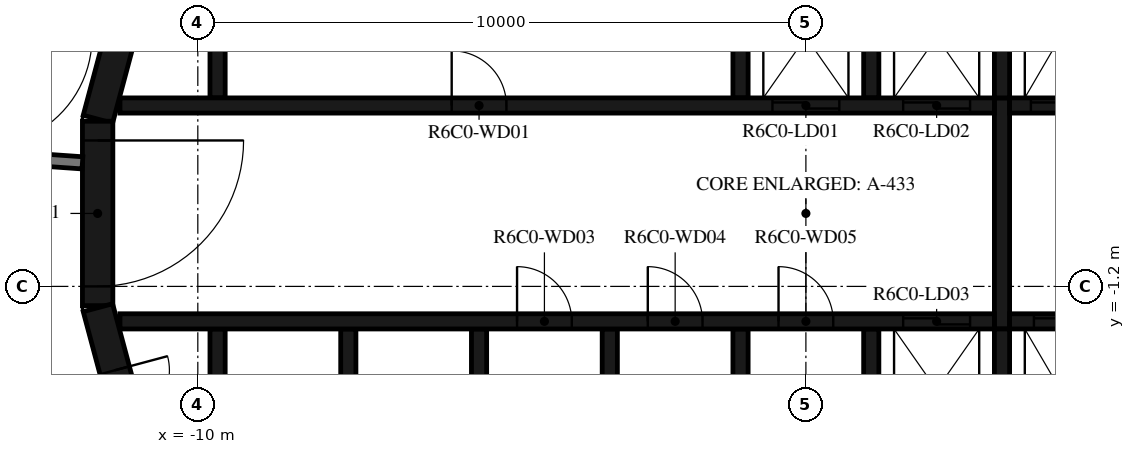
"""IFC4 building model, lengths in metres.
Left out: names, types, materials, properties, quantities, classifications, styles, units other than length and angle.
Written with IfcOpenShell. Run it as: python <this file> out.ifc"""

import sys

from ifc_helpers import new_model, si_unit, direction, frame, frame_2d, origin, place, context, subcontext, project, spatial, polyline, rectangle, outline, extrude, element, fill, save


model = new_model("IFC4")
c1 = context("Model", 3, precision=1e-05, world=origin(), true_north=direction((0.0, 1.0)))
c2 = subcontext(c1, "Body", "Model", "MODEL_VIEW")
j1 = project(units=[si_unit("LENGTHUNIT", "METRE"), si_unit("PLANEANGLEUNIT", "RADIAN")], contexts=[c1])
p1 = place(None, origin())
s1 = spatial("IfcSite", under=j1, at=p1, CompositionType="ELEMENT")
p2 = place(p1, origin())
s2 = spatial("IfcBuilding", under=s1, at=p2, CompositionType="ELEMENT")
p3 = place(p2, frame((0.0, 0.0, 254.7)))
s3 = spatial("IfcBuildingStorey", under=s2, at=p3, CompositionType="ELEMENT", Elevation=254.7)
p4 = place(p3, frame((-10.858, 4.479, 0.0), z_axis=(0.0, 0.0, 1.0), x_axis=(-0.258734743916, -0.965948410781, 0.0)))
e1 = element("IfcWall", 1, at=p4, inside=s3, PredefinedType="SHEAR", context=c2, shape_type="SweptSolid", body=[
    extrude(rectangle(XDim=3.033, YDim=0.5, at=frame_2d((1.516, 0.0))), origin(), (0.0, 0.0, 1.0), 3.05),
])
p5 = place(p3, frame((-11.647, 1.516, 0.0), z_axis=(0.0, 0.0, 1.0), x_axis=(0.0, -1.0, 0.0)))
e2 = element("IfcWall", 2, at=p5, inside=s3, PredefinedType="SHEAR", context=c2, shape_type="SweptSolid", body=[
    extrude(rectangle(XDim=3.033, YDim=0.5, at=frame_2d((1.516, 0.0))), origin(), (0.0, 0.0, 1.0), 3.05),
])
p6 = place(p5, frame((0.316, 0.0, 0.0)))
e3 = element("IfcOpeningElement", 3, at=p6, cuts=e2, PredefinedType="OPENING", context=c2, shape_type="SweptSolid", body=[
    extrude(rectangle(XDim=2.4, YDim=2.1, at=frame_2d((1.2, 1.05))), frame((0.0, 0.26, 0.0), z_axis=(0.0, -1.0, 0.0), x_axis=(1.0, 0.0, 0.0)), (0.0, 0.0, 1.0), 0.52),
])
p7 = place(p3, frame((-11.643, -1.55, 0.0), z_axis=(0.0, 0.0, 1.0), x_axis=(0.258734743916, -0.965948410781, 0.0)))
e4 = element("IfcWall", 4, at=p7, inside=s3, PredefinedType="SHEAR", context=c2, shape_type="SweptSolid", body=[
    extrude(rectangle(XDim=3.033, YDim=0.5, at=frame_2d((1.516, 0.0))), origin(), (0.0, 0.0, 1.0), 3.05),
])
p8 = place(p7, frame((1.066, 0.0, 0.0)))
e5 = element("IfcOpeningElement", 5, at=p8, cuts=e4, PredefinedType="OPENING", context=c2, shape_type="SweptSolid", body=[
    extrude(rectangle(XDim=0.9, YDim=2.1, at=frame_2d((0.45, 1.05))), frame((0.0, 0.26, 0.0), z_axis=(0.0, -1.0, 0.0), x_axis=(1.0, 0.0, 0.0)), (0.0, 0.0, 1.0), 0.52),
])
p9 = place(p3, origin())
e6 = element("IfcWall", 6, at=p9, inside=s3, PredefinedType="SHEAR", context=c2, shape_type="SweptSolid", body=[
    extrude(outline(polyline([(-9.55, 4.8), (-1.2, 4.8), (-1.2, 1.9), (-0.95, 1.9), (-0.95, 4.8), (0.95, 4.8), (0.95, 1.9), (1.2, 1.9), (1.2, 4.8), (3.1, 4.8), (3.1, 1.9), (3.35, 1.9), (3.35, 4.8), (5.25, 4.8), (5.25, 1.9), (5.5, 1.9), (5.5, 4.8), (7.4, 4.8), (7.4, 1.9), (7.65, 1.9), (7.65, 4.8), (9.55, 4.8), (9.55, 1.9), (9.8, 1.9), (9.8, 4.8), (9.8, 5.05), (-9.8, 5.05), (-9.8, 4.8), (-9.8, 1.9), (-9.55, 1.9), (-9.55, 4.8)])), origin(), (0.0, 0.0, 1.0), 3.05),
])
p10 = place(p3, origin())
e7 = element("IfcWall", 7, at=p10, inside=s3, PredefinedType="SHEAR", context=c2, shape_type="SweptSolid", body=[
    extrude(outline(polyline([(9.8, -5.05), (9.8, -4.8), (9.8, -1.9), (9.55, -1.9), (9.55, -4.8), (7.65, -4.8), (7.65, -1.9), (7.4, -1.9), (7.4, -4.8), (5.5, -4.8), (5.5, -1.9), (5.25, -1.9), (5.25, -4.8), (3.35, -4.8), (3.35, -1.9), (3.1, -1.9), (3.1, -4.8), (1.2, -4.8), (1.2, -1.9), (0.95, -1.9), (0.95, -4.8), (-0.95, -4.8), (-0.95, -1.9), (-1.2, -1.9), (-1.2, -4.8), (-3.1, -4.8), (-3.1, -1.9), (-3.35, -1.9), (-3.35, -4.8), (-5.25, -4.8), (-5.25, -1.9), (-5.5, -1.9), (-5.5, -4.8), (-7.4, -4.8), (-7.4, -1.9), (-7.65, -1.9), (-7.65, -4.8), (-9.55, -4.8), (-9.55, -1.9), (-9.8, -1.9), (-9.8, -4.8), (-9.8, -5.05), (9.8, -5.05)])), origin(), (0.0, 0.0, 1.0), 3.05),
])
p11 = place(p3, frame((-11.28, 1.775, 0.0), z_axis=(0.0, 0.0, 1.0), x_axis=(1.0, 0.0, 0.0)))
e8 = element("IfcWall", 8, at=p11, inside=s3, PredefinedType="SHEAR", context=c2, shape_type="SweptSolid", body=[
    extrude(rectangle(XDim=14.38, YDim=0.25, at=frame_2d((7.19, 0.0))), origin(), (0.0, 0.0, 1.0), 3.05),
])
p12 = place(p11, frame((10.73, 0.0, 0.0)))
e9 = element("IfcOpeningElement", 9, at=p12, cuts=e8, PredefinedType="OPENING", context=c2, shape_type="SweptSolid", body=[
    extrude(rectangle(XDim=1.1, YDim=2.1, at=frame_2d((0.55, 1.05))), frame((0.0, 0.135, 0.0), z_axis=(0.0, -1.0, 0.0), x_axis=(1.0, 0.0, 0.0)), (0.0, 0.0, 1.0), 0.27),
])
p13 = place(p11, frame((12.88, 0.0, 0.0)))
e10 = element("IfcOpeningElement", 10, at=p13, cuts=e8, PredefinedType="OPENING", context=c2, shape_type="SweptSolid", body=[
    extrude(rectangle(XDim=1.1, YDim=2.1, at=frame_2d((0.55, 1.05))), frame((0.0, 0.135, 0.0), z_axis=(0.0, -1.0, 0.0), x_axis=(1.0, 0.0, 0.0)), (0.0, 0.0, 1.0), 0.27),
])
p14 = place(p11, frame((5.455, 0.0, 0.0)))
e11 = element("IfcOpeningElement", 11, at=p14, cuts=e8, PredefinedType="OPENING", context=c2, shape_type="SweptSolid", body=[
    extrude(rectangle(XDim=0.9, YDim=2.1, at=frame_2d((0.45, 1.05))), frame((0.0, 0.135, 0.0), z_axis=(0.0, -1.0, 0.0), x_axis=(1.0, 0.0, 0.0)), (0.0, 0.0, 1.0), 0.27),
])
p15 = place(p3, frame((3.35, 1.775, 0.0), z_axis=(0.0, 0.0, 1.0), x_axis=(1.0, 0.0, 0.0)))
e12 = element("IfcWall", 12, at=p15, inside=s3, PredefinedType="SHEAR", context=c2, shape_type="SweptSolid", body=[
    extrude(rectangle(XDim=7.93, YDim=0.25, at=frame_2d((3.965, 0.0))), origin(), (0.0, 0.0, 1.0), 3.05),
])
p16 = place(p15, frame((0.35, 0.0, 0.0)))
e13 = element("IfcOpeningElement", 13, at=p16, cuts=e12, PredefinedType="OPENING", context=c2, shape_type="SweptSolid", body=[
    extrude(rectangle(XDim=1.2, YDim=2.4, at=frame_2d((0.6, 1.2))), frame((0.0, 0.135, 0.0), z_axis=(0.0, -1.0, 0.0), x_axis=(1.0, 0.0, 0.0)), (0.0, 0.0, 1.0), 0.27),
])
p17 = place(p15, frame((2.5, 0.0, 0.0)))
e14 = element("IfcOpeningElement", 14, at=p17, cuts=e12, PredefinedType="OPENING", context=c2, shape_type="SweptSolid", body=[
    extrude(rectangle(XDim=1.2, YDim=2.4, at=frame_2d((0.6, 1.2))), frame((0.0, 0.135, 0.0), z_axis=(0.0, -1.0, 0.0), x_axis=(1.0, 0.0, 0.0)), (0.0, 0.0, 1.0), 0.27),
])
p18 = place(p15, frame((4.8, 0.0, 0.0)))
e15 = element("IfcOpeningElement", 15, at=p18, cuts=e12, PredefinedType="OPENING", context=c2, shape_type="SweptSolid", body=[
    extrude(rectangle(XDim=0.9, YDim=2.1, at=frame_2d((0.45, 1.05))), frame((0.0, 0.135, 0.0), z_axis=(0.0, -1.0, 0.0), x_axis=(1.0, 0.0, 0.0)), (0.0, 0.0, 1.0), 0.27),
])
p19 = place(p3, frame((-11.28, -1.775, 0.0), z_axis=(0.0, 0.0, 1.0), x_axis=(1.0, 0.0, 0.0)))
e16 = element("IfcWall", 16, at=p19, inside=s3, PredefinedType="SHEAR", context=c2, shape_type="SweptSolid", body=[
    extrude(rectangle(XDim=14.38, YDim=0.25, at=frame_2d((7.19, 0.0))), origin(), (0.0, 0.0, 1.0), 3.05),
])
p20 = place(p19, frame((12.88, 0.0, 0.0)))
e17 = element("IfcOpeningElement", 17, at=p20, cuts=e16, PredefinedType="OPENING", context=c2, shape_type="SweptSolid", body=[
    extrude(rectangle(XDim=1.1, YDim=2.1, at=frame_2d((0.55, 1.05))), frame((0.0, 0.135, 0.0), z_axis=(0.0, -1.0, 0.0), x_axis=(1.0, 0.0, 0.0)), (0.0, 0.0, 1.0), 0.27),
])
p21 = place(p19, frame((6.53, 0.0, 0.0)))
e18 = element("IfcOpeningElement", 18, at=p21, cuts=e16, PredefinedType="OPENING", context=c2, shape_type="SweptSolid", body=[
    extrude(rectangle(XDim=0.9, YDim=2.1, at=frame_2d((0.45, 1.05))), frame((0.0, 0.135, 0.0), z_axis=(0.0, -1.0, 0.0), x_axis=(1.0, 0.0, 0.0)), (0.0, 0.0, 1.0), 0.27),
])
p22 = place(p19, frame((8.68, 0.0, 0.0)))
e19 = element("IfcOpeningElement", 19, at=p22, cuts=e16, PredefinedType="OPENING", context=c2, shape_type="SweptSolid", body=[
    extrude(rectangle(XDim=0.9, YDim=2.1, at=frame_2d((0.45, 1.05))), frame((0.0, 0.135, 0.0), z_axis=(0.0, -1.0, 0.0), x_axis=(1.0, 0.0, 0.0)), (0.0, 0.0, 1.0), 0.27),
])
p23 = place(p19, frame((10.83, 0.0, 0.0)))
e20 = element("IfcOpeningElement", 20, at=p23, cuts=e16, PredefinedType="OPENING", context=c2, shape_type="SweptSolid", body=[
    extrude(rectangle(XDim=0.9, YDim=2.1, at=frame_2d((0.45, 1.05))), frame((0.0, 0.135, 0.0), z_axis=(0.0, -1.0, 0.0), x_axis=(1.0, 0.0, 0.0)), (0.0, 0.0, 1.0), 0.27),
])
p24 = place(p3, frame((3.35, -1.775, 0.0), z_axis=(0.0, 0.0, 1.0), x_axis=(1.0, 0.0, 0.0)))
e21 = element("IfcWall", 21, at=p24, inside=s3, PredefinedType="SHEAR", context=c2, shape_type="SweptSolid", body=[
    extrude(rectangle(XDim=7.93, YDim=0.25, at=frame_2d((3.965, 0.0))), origin(), (0.0, 0.0, 1.0), 3.05),
])
p25 = place(p24, frame((0.4, 0.0, 0.0)))
e22 = element("IfcOpeningElement", 22, at=p25, cuts=e21, PredefinedType="OPENING", context=c2, shape_type="SweptSolid", body=[
    extrude(rectangle(XDim=1.1, YDim=2.4, at=frame_2d((0.55, 1.2))), frame((0.0, 0.135, 0.0), z_axis=(0.0, -1.0, 0.0), x_axis=(1.0, 0.0, 0.0)), (0.0, 0.0, 1.0), 0.27),
])
p26 = place(p24, frame((2.55, 0.0, 0.0)))
e23 = element("IfcOpeningElement", 23, at=p26, cuts=e21, PredefinedType="OPENING", context=c2, shape_type="SweptSolid", body=[
    extrude(rectangle(XDim=1.1, YDim=2.4, at=frame_2d((0.55, 1.2))), frame((0.0, 0.135, 0.0), z_axis=(0.0, -1.0, 0.0), x_axis=(1.0, 0.0, 0.0)), (0.0, 0.0, 1.0), 0.27),
])
p27 = place(p24, frame((4.7, 0.0, 0.0)))
e24 = element("IfcOpeningElement", 24, at=p27, cuts=e21, PredefinedType="OPENING", context=c2, shape_type="SweptSolid", body=[
    extrude(rectangle(XDim=1.1, YDim=2.4, at=frame_2d((0.55, 1.2))), frame((0.0, 0.135, 0.0), z_axis=(0.0, -1.0, 0.0), x_axis=(1.0, 0.0, 0.0)), (0.0, 0.0, 1.0), 0.27),
])
p28 = place(p3, frame((3.225, -1.9, 0.0), z_axis=(0.0, 0.0, 1.0), x_axis=(0.0, 1.0, 0.0)))
e25 = element("IfcWall", 25, at=p28, inside=s3, PredefinedType="SHEAR", context=c2, shape_type="SweptSolid", body=[
    extrude(rectangle(XDim=3.8, YDim=0.25, at=frame_2d((1.9, 0.0))), origin(), (0.0, 0.0, 1.0), 3.05),
])
p29 = place(p3, frame((-13.454, 0.941, 0.0), z_axis=(0.0, 0.0, 1.0), x_axis=(0.99755155062, -0.069934997354, 0.0)))
e26 = element("IfcWall", 26, at=p29, inside=s3, PredefinedType="STANDARD", context=c2, shape_type="SweptSolid", body=[
    extrude(rectangle(XDim=1.561, YDim=0.2, at=frame_2d((0.78, 0.0))), origin(), (0.0, 0.0, 1.0), 3.05),
])
p30 = place(p6, origin())
e27 = element("IfcDoor", 27, at=p30, inside=s3, OperationType="DOUBLE_DOOR_SINGLE_SWING", PredefinedType="DOOR", context=c2, shape_type="SweptSolid", body=[
    extrude(rectangle(XDim=2.4, YDim=2.1, at=frame_2d((1.2, 1.05))), frame((0.0, 0.025, 0.0), z_axis=(0.0, -1.0, 0.0), x_axis=(1.0, 0.0, 0.0)), (0.0, 0.0, 1.0), 0.05),
])
fill(e3, e27)
p31 = place(p12, origin())
e28 = element("IfcDoor", 28, at=p31, inside=s3, OperationType="DOUBLE_DOOR_SLIDING", PredefinedType="DOOR", context=c2, shape_type="SweptSolid", body=[
    extrude(rectangle(XDim=1.1, YDim=2.1, at=frame_2d((0.55, 1.05))), frame((0.0, 0.025, 0.0), z_axis=(0.0, -1.0, 0.0), x_axis=(1.0, 0.0, 0.0)), (0.0, 0.0, 1.0), 0.05),
])
fill(e9, e28)
p32 = place(p13, origin())
e29 = element("IfcDoor", 29, at=p32, inside=s3, OperationType="DOUBLE_DOOR_SLIDING", PredefinedType="DOOR", context=c2, shape_type="SweptSolid", body=[
    extrude(rectangle(XDim=1.1, YDim=2.1, at=frame_2d((0.55, 1.05))), frame((0.0, 0.025, 0.0), z_axis=(0.0, -1.0, 0.0), x_axis=(1.0, 0.0, 0.0)), (0.0, 0.0, 1.0), 0.05),
])
fill(e10, e29)
p33 = place(p16, origin())
e30 = element("IfcDoor", 30, at=p33, inside=s3, OperationType="DOUBLE_DOOR_SLIDING", PredefinedType="DOOR", context=c2, shape_type="SweptSolid", body=[
    extrude(rectangle(XDim=1.2, YDim=2.4, at=frame_2d((0.6, 1.2))), frame((0.0, 0.025, 0.0), z_axis=(0.0, -1.0, 0.0), x_axis=(1.0, 0.0, 0.0)), (0.0, 0.0, 1.0), 0.05),
])
fill(e13, e30)
p34 = place(p20, origin())
e31 = element("IfcDoor", 31, at=p34, inside=s3, OperationType="DOUBLE_DOOR_SLIDING", PredefinedType="DOOR", context=c2, shape_type="SweptSolid", body=[
    extrude(rectangle(XDim=1.1, YDim=2.1, at=frame_2d((0.55, 1.05))), frame((0.0, 0.025, 0.0), z_axis=(0.0, -1.0, 0.0), x_axis=(1.0, 0.0, 0.0)), (0.0, 0.0, 1.0), 0.05),
])
fill(e17, e31)
p35 = place(p25, origin())
e32 = element("IfcDoor", 32, at=p35, inside=s3, OperationType="DOUBLE_DOOR_SLIDING", PredefinedType="DOOR", context=c2, shape_type="SweptSolid", body=[
    extrude(rectangle(XDim=1.1, YDim=2.4, at=frame_2d((0.55, 1.2))), frame((0.0, 0.025, 0.0), z_axis=(0.0, -1.0, 0.0), x_axis=(1.0, 0.0, 0.0)), (0.0, 0.0, 1.0), 0.05),
])
fill(e22, e32)
p36 = place(p14, origin())
e33 = element("IfcDoor", 33, at=p36, inside=s3, OperationType="SINGLE_SWING_LEFT", PredefinedType="DOOR", context=c2, shape_type="SweptSolid", body=[
    extrude(rectangle(XDim=0.9, YDim=2.1, at=frame_2d((0.45, 1.05))), frame((0.0, 0.025, 0.0), z_axis=(0.0, -1.0, 0.0), x_axis=(1.0, 0.0, 0.0)), (0.0, 0.0, 1.0), 0.05),
])
fill(e11, e33)
p37 = place(p21, origin())
e34 = element("IfcDoor", 34, at=p37, inside=s3, OperationType="SINGLE_SWING_LEFT", PredefinedType="DOOR", context=c2, shape_type="SweptSolid", body=[
    extrude(rectangle(XDim=0.9, YDim=2.1, at=frame_2d((0.45, 1.05))), frame((0.0, 0.025, 0.0), z_axis=(0.0, -1.0, 0.0), x_axis=(1.0, 0.0, 0.0)), (0.0, 0.0, 1.0), 0.05),
])
fill(e18, e34)
p38 = place(p22, origin())
e35 = element("IfcDoor", 35, at=p38, inside=s3, OperationType="SINGLE_SWING_RIGHT", PredefinedType="DOOR", context=c2, shape_type="SweptSolid", body=[
    extrude(rectangle(XDim=0.9, YDim=2.1, at=frame_2d((0.45, 1.05))), frame((0.0, 0.025, 0.0), z_axis=(0.0, -1.0, 0.0), x_axis=(1.0, 0.0, 0.0)), (0.0, 0.0, 1.0), 0.05),
])
fill(e19, e35)
p39 = place(p23, origin())
e36 = element("IfcDoor", 36, at=p39, inside=s3, OperationType="SINGLE_SWING_LEFT", PredefinedType="DOOR", context=c2, shape_type="SweptSolid", body=[
    extrude(rectangle(XDim=0.9, YDim=2.1, at=frame_2d((0.45, 1.05))), frame((0.0, 0.025, 0.0), z_axis=(0.0, -1.0, 0.0), x_axis=(1.0, 0.0, 0.0)), (0.0, 0.0, 1.0), 0.05),
])
fill(e20, e36)
p40 = place(p8, origin())
e37 = element("IfcDoor", 37, at=p40, inside=s3, OperationType="SINGLE_SWING_RIGHT", PredefinedType="DOOR", context=c2, shape_type="SweptSolid", body=[
    extrude(rectangle(XDim=0.9, YDim=2.1, at=frame_2d((0.45, 1.05))), frame((0.0, 0.025, 0.0), z_axis=(0.0, -1.0, 0.0), x_axis=(1.0, 0.0, 0.0)), (0.0, 0.0, 1.0), 0.05),
])
fill(e5, e37)
save(model, sys.argv[1])
